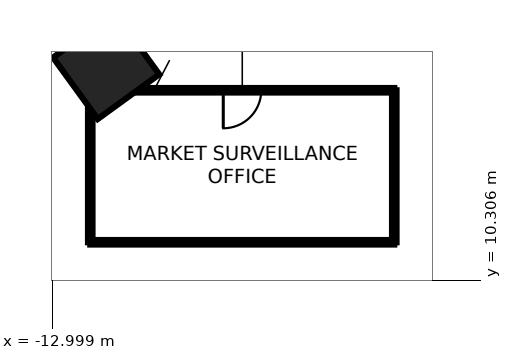
"""IFC4 building model, lengths in metres.
Left out: names, types, materials, properties, quantities, classifications, styles, units other than length and angle.
Written with IfcOpenShell. Run it as: python <this file> out.ifc"""

import sys

from ifc_helpers import new_model, si_unit, direction, frame, frame_2d, origin, origin_2d, place, context, subcontext, project, spatial, rectangle, extrude, element, fill, save


model = new_model("IFC4")
c1 = context("Model", 3, precision=1e-05, world=origin(), true_north=direction((0.0, 1.0)))
c2 = subcontext(c1, "Body", "Model", "MODEL_VIEW")
j1 = project(units=[si_unit("LENGTHUNIT", "METRE"), si_unit("PLANEANGLEUNIT", "RADIAN")], contexts=[c1])
p1 = place(None, origin())
s1 = spatial("IfcSite", under=j1, at=p1, CompositionType="ELEMENT")
p2 = place(p1, origin())
s2 = spatial("IfcBuilding", under=s1, at=p2, CompositionType="ELEMENT")
p3 = place(p2, frame((0.0, 0.0, 19.6)))
s3 = spatial("IfcBuildingStorey", under=s2, at=p3, CompositionType="ELEMENT", Elevation=19.6)
p4 = place(p3, frame((-11.581, 15.94, 0.0), z_axis=(0.0, 0.0, 1.0), x_axis=(-0.587785252292, 0.809016994375, 0.0)))
e1 = element("IfcColumn", 1, at=p4, inside=s3, PredefinedType="COLUMN", context=c2, shape_type="SweptSolid", body=[
    extrude(rectangle(XDim=2.0, YDim=2.0, at=origin_2d()), origin(), (0.0, 0.0, 1.0), 4.2),
])
p5 = place(p3, frame((-4.0, 15.3, 0.0), z_axis=(0.0, 0.0, 1.0), x_axis=(0.0, -1.0, 0.0)))
e2 = element("IfcWall", 2, at=p5, inside=s3, PredefinedType="PARTITIONING", context=c2, shape_type="SweptSolid", body=[
    extrude(rectangle(XDim=4.0, YDim=0.12, at=frame_2d((2.0, 0.0))), origin(), (0.0, 0.0, 1.0), 4.04),
])
p6 = place(p3, frame((-12.0, 15.3, 0.0), z_axis=(0.0, 0.0, 1.0), x_axis=(1.0, 0.0, 0.0)))
e3 = element("IfcWall", 3, at=p6, inside=s3, PredefinedType="PARTITIONING", context=c2, shape_type="SweptSolid", body=[
    extrude(rectangle(XDim=8.0, YDim=0.12, at=frame_2d((4.0, 0.0))), origin(), (0.0, 0.0, 1.0), 4.04),
])
p7 = place(p6, frame((3.5, 0.0, 0.0)))
e4 = element("IfcOpeningElement", 4, at=p7, cuts=e3, PredefinedType="OPENING", context=c2, shape_type="SweptSolid", body=[
    extrude(rectangle(XDim=1.0, YDim=2.4, at=frame_2d((0.5, 1.2))), frame((0.0, 0.07, 0.0), z_axis=(0.0, -1.0, 0.0), x_axis=(1.0, 0.0, 0.0)), (0.0, 0.0, 1.0), 0.14),
])
p8 = place(p3, frame((-4.0, 11.3, 0.0), z_axis=(0.0, 0.0, 1.0), x_axis=(-1.0, 0.0, 0.0)))
e5 = element("IfcWall", 5, at=p8, inside=s3, PredefinedType="PARTITIONING", context=c2, shape_type="SweptSolid", body=[
    extrude(rectangle(XDim=8.0, YDim=0.12, at=frame_2d((4.0, 0.0))), origin(), (0.0, 0.0, 1.0), 4.04),
])
p9 = place(p3, frame((-12.0, 11.3, 0.0), z_axis=(0.0, 0.0, 1.0), x_axis=(0.0, 1.0, 0.0)))
e6 = element("IfcWall", 6, at=p9, inside=s3, PredefinedType="PARTITIONING", context=c2, shape_type="SweptSolid", body=[
    extrude(rectangle(XDim=4.0, YDim=0.12, at=frame_2d((2.0, 0.0))), origin(), (0.0, 0.0, 1.0), 4.04),
])
p10 = place(p7, frame((1.0, 0.0, 0.0), z_axis=(0.0, 0.0, 1.0), x_axis=(-1.0, 0.0, 0.0)))
e7 = element("IfcDoor", 7, at=p10, inside=s3, OperationType="SINGLE_SWING_RIGHT", PredefinedType="DOOR", context=c2, shape_type="SweptSolid", body=[
    extrude(rectangle(XDim=1.0, YDim=2.4, at=frame_2d((0.5, 1.2))), frame((0.0, 0.025, 0.0), z_axis=(0.0, -1.0, 0.0), x_axis=(1.0, 0.0, 0.0)), (0.0, 0.0, 1.0), 0.05),
])
fill(e4, e7)
save(model, sys.argv[1])
